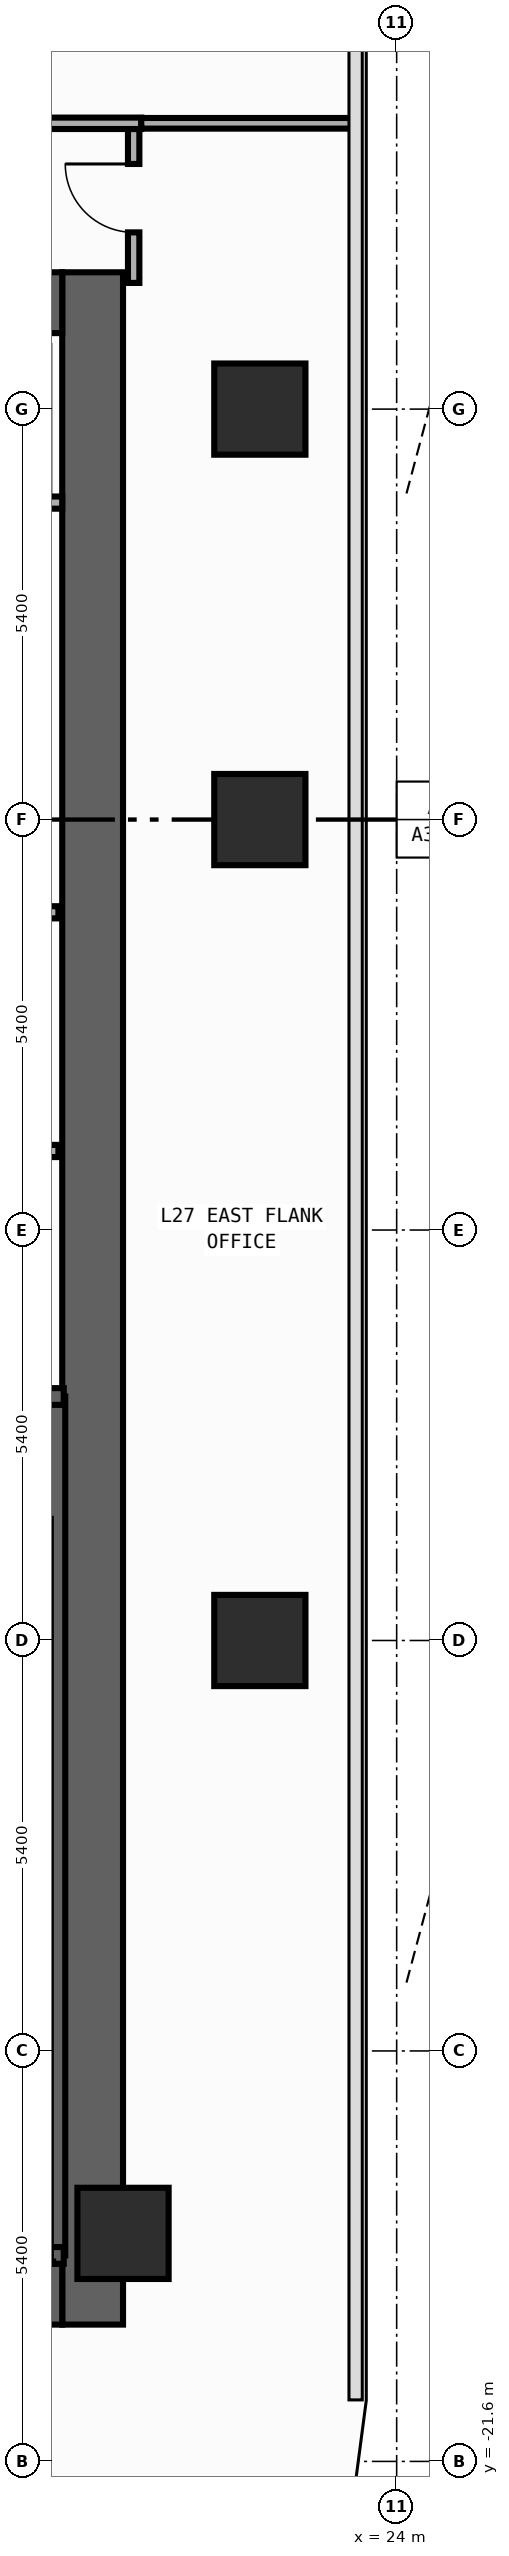
"""IFC4 building model, lengths in metres.
Left out: names, types, materials, properties, quantities, classifications, styles, units other than length and angle.
Written with IfcOpenShell. Run it as: python <this file> out.ifc"""

import sys

from ifc_helpers import new_model, si_unit, direction, frame, frame_2d, origin, origin_2d, place, context, subcontext, project, spatial, rectangle, extrude, element, fill, save


model = new_model("IFC4")
c1 = context("Model", 3, precision=1e-05, world=origin(), true_north=direction((0.0, 1.0)))
c2 = subcontext(c1, "Body", "Model", "MODEL_VIEW")
j1 = project(units=[si_unit("LENGTHUNIT", "METRE"), si_unit("PLANEANGLEUNIT", "RADIAN")], contexts=[c1])
p1 = place(None, origin())
s1 = spatial("IfcSite", under=j1, at=p1, CompositionType="ELEMENT")
p2 = place(p1, origin())
s2 = spatial("IfcBuilding", under=s1, at=p2, CompositionType="ELEMENT")
p3 = place(p2, frame((0.0, 0.0, 118.4)))
s3 = spatial("IfcBuildingStorey", under=s2, at=p3, CompositionType="ELEMENT", Elevation=118.4)
p4 = place(p3, frame((20.0, -19.8, 0.0), z_axis=(0.0, 0.0, 1.0), x_axis=(0.0, 1.0, 0.0)))
e1 = element("IfcWall", 1, at=p4, inside=s3, PredefinedType="SHEAR", context=c2, shape_type="SweptSolid", body=[
    extrude(rectangle(XDim=27.0, YDim=0.8, at=frame_2d((13.5, 0.0))), origin(), (0.0, 0.0, 1.0), 3.94),
])
for number, where, z_axis, x_axis in (
    (2, (12.8, -19.4, 0.0), (0.0, 0.0, 1.0), (1.0, 0.0, 0.0)),
    (3, (12.8, 6.8, 0.0), (0.0, 0.0, 1.0), (1.0, 0.0, 0.0)),
):
    element("IfcWall", number, at=place(p3, frame(where, z_axis=z_axis, x_axis=x_axis)), inside=s3, PredefinedType="SHEAR", context=c2, shape_type="SweptSolid", body=[
        extrude(rectangle(XDim=6.8, YDim=0.8, at=frame_2d((3.4, 0.0))), origin(), (0.0, 0.0, 1.0), 3.94),
    ])
p5 = place(p3, frame((19.53, -18.89, 0.0), z_axis=(0.0, 0.0, 1.0), x_axis=(0.0, 1.0, 0.0)))
e4 = element("IfcWall", 4, at=p5, inside=s3, PredefinedType="SHEAR", context=c2, shape_type="SweptSolid", body=[
    extrude(rectangle(XDim=11.3, YDim=0.22, at=frame_2d((5.65, 0.0))), origin(), (0.0, 0.0, 1.0), 3.94),
])
p6 = place(p3, frame((15.705, -18.89, 0.0), z_axis=(0.0, 0.0, 1.0), x_axis=(1.0, 0.0, 0.0)))
e5 = element("IfcWall", 5, at=p6, inside=s3, PredefinedType="SHEAR", context=c2, shape_type="SweptSolid", body=[
    extrude(rectangle(XDim=3.915, YDim=0.22, at=frame_2d((1.958, 0.0))), origin(), (0.0, 0.0, 1.0), 3.94),
])
p7 = place(p3, frame((19.62, -7.59, 0.0), z_axis=(0.0, 0.0, 1.0), x_axis=(-1.0, 0.0, 0.0)))
e6 = element("IfcWall", 6, at=p7, inside=s3, PredefinedType="SHEAR", context=c2, shape_type="SweptSolid", body=[
    extrude(rectangle(XDim=3.915, YDim=0.22, at=frame_2d((1.958, 0.0))), origin(), (0.0, 0.0, 1.0), 3.94),
])
p8 = place(p7, frame((1.08, 0.0, 0.0)))
e7 = element("IfcOpeningElement", 7, at=p8, cuts=e6, PredefinedType="OPENING", context=c2, shape_type="SweptSolid", body=[
    extrude(rectangle(XDim=1.1, YDim=2.2, at=frame_2d((0.55, 1.1))), frame((0.0, 0.12, 0.0), z_axis=(0.0, -1.0, 0.0), x_axis=(1.0, 0.0, 0.0)), (0.0, 0.0, 1.0), 0.24),
])
for number, where, z_axis, x_axis in (
    (8, (20.4, -18.6, 0.0), (0.0, 0.0, 1.0), (1.0, 0.0, 0.0)),
    (9, (22.2, -10.8, 0.0), (0.0, 0.0, 1.0), (1.0, 0.0, 0.0)),
    (10, (22.2, 0.0, 0.0), (0.0, 0.0, 1.0), (1.0, 0.0, 0.0)),
    (11, (22.2, 5.4, 0.0), (0.0, 0.0, 1.0), (1.0, 0.0, 0.0)),
):
    element("IfcColumn", number, at=place(p3, frame(where, z_axis=z_axis, x_axis=x_axis)), inside=s3, PredefinedType="COLUMN", context=c2, shape_type="SweptSolid", body=[
        extrude(rectangle(XDim=1.2, YDim=1.2, at=origin_2d()), origin(), (0.0, 0.0, 1.0), 4.2),
    ])
p9 = place(p3, frame((15.75, -4.36, 0.0), z_axis=(0.0, 0.0, 1.0), x_axis=(1.0, 0.0, 0.0)))
e12 = element("IfcWall", 12, at=p9, inside=s3, PredefinedType="STANDARD", context=c2, shape_type="SweptSolid", body=[
    extrude(rectangle(XDim=3.8, YDim=0.16, at=frame_2d((1.9, 0.0))), origin(), (0.0, 0.0, 1.0), 3.94),
])
p10 = place(p9, frame((1.47, 0.0, 0.0)))
e13 = element("IfcOpeningElement", 13, at=p10, cuts=e12, PredefinedType="OPENING", context=c2, shape_type="SweptSolid", body=[
    extrude(rectangle(XDim=1.15, YDim=2.2, at=frame_2d((0.575, 1.1))), frame((0.0, 0.09, 0.0), z_axis=(0.0, -1.0, 0.0), x_axis=(1.0, 0.0, 0.0)), (0.0, 0.0, 1.0), 0.18),
])
p11 = place(p3, frame((15.75, -1.22, 0.0), z_axis=(0.0, 0.0, 1.0), x_axis=(1.0, 0.0, 0.0)))
e14 = element("IfcWall", 14, at=p11, inside=s3, PredefinedType="STANDARD", context=c2, shape_type="SweptSolid", body=[
    extrude(rectangle(XDim=3.8, YDim=0.16, at=frame_2d((1.9, 0.0))), origin(), (0.0, 0.0, 1.0), 3.94),
])
p12 = place(p3, frame((17.31, 4.17, 0.0), z_axis=(0.0, 0.0, 1.0), x_axis=(1.0, 0.0, 0.0)))
e15 = element("IfcWall", 15, at=p12, inside=s3, PredefinedType="PARTITIONING", context=c2, shape_type="SweptSolid", body=[
    extrude(rectangle(XDim=2.29, YDim=0.16, at=frame_2d((1.145, 0.0))), origin(), (0.0, 0.0, 1.0), 3.94),
])
p13 = place(p3, frame((20.54, 7.06, 0.0), z_axis=(0.0, 0.0, 1.0), x_axis=(0.0, 1.0, 0.0)))
e16 = element("IfcWall", 16, at=p13, inside=s3, PredefinedType="PARTITIONING", context=c2, shape_type="SweptSolid", body=[
    extrude(rectangle(XDim=2.025, YDim=0.15, at=frame_2d((1.012, 0.0))), origin(), (0.0, 0.0, 1.0), 3.94),
])
p14 = place(p13, frame((0.665, 0.0, 0.0)))
e17 = element("IfcOpeningElement", 17, at=p14, cuts=e16, PredefinedType="OPENING", context=c2, shape_type="SweptSolid", body=[
    extrude(rectangle(XDim=0.9, YDim=2.15, at=frame_2d((0.45, 1.075))), frame((0.0, 0.085, 0.0), z_axis=(0.0, -1.0, 0.0), x_axis=(1.0, 0.0, 0.0)), (0.0, 0.0, 1.0), 0.17),
])
p15 = place(p3, frame((11.81, 9.16, 0.0), z_axis=(0.0, 0.0, 1.0), x_axis=(1.0, 0.0, 0.0)))
e18 = element("IfcWall", 18, at=p15, inside=s3, PredefinedType="PARTITIONING", context=c2, shape_type="SweptSolid", body=[
    extrude(rectangle(XDim=8.83, YDim=0.15, at=frame_2d((4.415, 0.0))), origin(), (0.0, 0.0, 1.0), 3.94),
])
p16 = place(p15, frame((5.067, 0.0, 0.0)))
e19 = element("IfcOpeningElement", 19, at=p16, cuts=e18, PredefinedType="OPENING", context=c2, shape_type="SweptSolid", body=[
    extrude(rectangle(XDim=0.9, YDim=2.15, at=frame_2d((0.45, 1.075))), frame((0.0, 0.085, 0.0), z_axis=(0.0, -1.0, 0.0), x_axis=(1.0, 0.0, 0.0)), (0.0, 0.0, 1.0), 0.17),
])
p17 = place(p3, frame((20.64, 9.16, 0.0), z_axis=(0.0, 0.0, 1.0), x_axis=(1.0, 0.0, 0.0)))
e20 = element("IfcWall", 20, at=p17, inside=s3, PredefinedType="PARTITIONING", context=c2, shape_type="SweptSolid", body=[
    extrude(rectangle(XDim=2.815, YDim=0.14, at=frame_2d((1.408, 0.0))), origin(), (0.0, 0.0, 1.0), 3.94),
])
p18 = place(p14, origin())
e21 = element("IfcDoor", 21, at=p18, inside=s3, OperationType="SINGLE_SWING_RIGHT", PredefinedType="DOOR", context=c2, shape_type="SweptSolid", body=[
    extrude(rectangle(XDim=0.9, YDim=2.15, at=frame_2d((0.45, 1.075))), frame((0.0, 0.025, 0.0), z_axis=(0.0, -1.0, 0.0), x_axis=(1.0, 0.0, 0.0)), (0.0, 0.0, 1.0), 0.05),
])
fill(e17, e21)
save(model, sys.argv[1])
